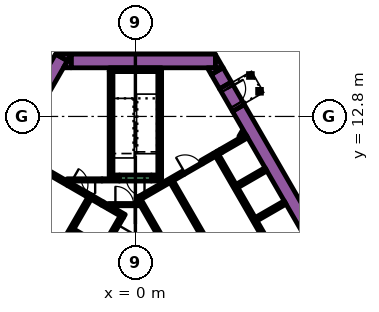
"""IFC4 building model, lengths in metres.
Left out: names, types, materials, properties, quantities, classifications, styles, units other than length and angle.
Written with IfcOpenShell. Run it as: python <this file> out.ifc"""

import sys

from ifc_helpers import new_model, si_unit, direction, frame, frame_2d, origin, origin_2d, place, context, subcontext, project, spatial, polyline, rectangle, outline, extrude, element, fill, save


model = new_model("IFC4")
c1 = context("Model", 3, precision=1e-05, world=origin(), true_north=direction((0.0, 1.0)))
c2 = subcontext(c1, "Body", "Model", "MODEL_VIEW")
j1 = project(units=[si_unit("LENGTHUNIT", "METRE"), si_unit("PLANEANGLEUNIT", "RADIAN")], contexts=[c1])
p1 = place(None, origin())
s1 = spatial("IfcSite", under=j1, at=p1, CompositionType="ELEMENT")
p2 = place(p1, origin())
s2 = spatial("IfcBuilding", under=s1, at=p2, CompositionType="ELEMENT")
p3 = place(p2, frame((0.0, 0.0, 11.4)))
s3 = spatial("IfcBuildingStorey", under=s2, at=p3, CompositionType="ELEMENT", Elevation=11.4)
p4 = place(p3, frame((6.776, 13.364, 0.0), z_axis=(0.0, 0.0, 1.0), x_axis=(0.500004177138, -0.8660229921, 0.0)))
e1 = element("IfcWall", 1, at=p4, inside=s3, PredefinedType="SOLIDWALL", context=c2, shape_type="SweptSolid", body=[
    extrude(rectangle(XDim=20.204, YDim=0.9, at=frame_2d((10.102, 0.0))), origin(), (0.0, 0.0, 1.0), 4.8),
])
p5 = place(p3, frame((-15.36, -1.503, 0.0), z_axis=(0.0, 0.0, 1.0), x_axis=(0.50000389221, 0.866023156604, 0.0)))
e2 = element("IfcWall", 2, at=p5, inside=s3, PredefinedType="SOLIDWALL", context=c2, shape_type="SweptSolid", body=[
    extrude(rectangle(XDim=21.0, YDim=0.9, at=frame_2d((10.5, 0.0))), origin(), (0.0, 0.0, 1.0), 4.8),
])
p6 = place(p3, origin())
e3 = element("IfcWall", 3, at=p6, inside=s3, PredefinedType="SOLIDWALL", context=c2, shape_type="SweptSolid", body=[
    extrude(outline(polyline([(-4.215, 16.9), (-4.469, 16.46), (-5.231, 16.9), (-4.215, 16.9)])), origin(), (0.0, 0.0, 1.0), 4.8),
])
p7 = place(p3, frame((-4.224, 16.45, 0.0), z_axis=(0.0, 0.0, 1.0), x_axis=(1.0, 0.0, 0.0)))
e4 = element("IfcWall", 4, at=p7, inside=s3, PredefinedType="SOLIDWALL", context=c2, shape_type="SweptSolid", body=[
    extrude(rectangle(XDim=9.488, YDim=0.9, at=frame_2d((4.744, 0.0))), origin(), (0.0, 0.0, 1.0), 4.8),
])
e5 = element("IfcWall", 5, at=p6, inside=s3, PredefinedType="SOLIDWALL", context=c2, shape_type="SweptSolid", body=[
    extrude(outline(polyline([(5.265, 16.0), (5.265, 16.88), (5.773, 16.0), (5.265, 16.0)])), origin(), (0.0, 0.0, 1.0), 4.8),
])
e6 = element("IfcWall", 6, at=p6, inside=s3, PredefinedType="SOLIDWALL", context=c2, shape_type="SweptSolid", body=[
    extrude(outline(polyline([(-4.734, 16.0), (-4.226, 16.88), (-4.226, 16.0), (-4.734, 16.0)])), origin(), (0.0, 0.0, 1.0), 4.8),
])
p8 = place(p3, frame((5.926, 14.836, 0.0), z_axis=(0.0, 0.0, 1.0), x_axis=(-0.500076735116, 0.865981096212, 0.0)))
e7 = element("IfcWall", 7, at=p8, inside=s3, PredefinedType="SOLIDWALL", context=c2, shape_type="SweptSolid", body=[
    extrude(rectangle(XDim=1.094, YDim=0.9, at=frame_2d((0.547, 0.0))), origin(), (0.0, 0.0, 1.0), 4.8),
])
e8 = element("IfcWall", 8, at=p6, inside=s3, PredefinedType="SOLIDWALL", context=c2, shape_type="SweptSolid", body=[
    extrude(outline(polyline([(4.734, 16.0), (5.75, 16.0), (4.988, 15.56), (4.734, 16.0)])), origin(), (0.0, 0.0, 1.0), 4.8),
])
p9 = place(p3, frame((-1.725, 15.875, 0.0), z_axis=(0.0, 0.0, 1.0), x_axis=(1.0, 0.0, 0.0)))
e9 = element("IfcWall", 9, at=p9, inside=s3, PredefinedType="SOLIDWALL", context=c2, shape_type="SweptSolid", body=[
    extrude(rectangle(XDim=3.45, YDim=0.25, at=frame_2d((1.725, 0.0))), origin(), (0.0, 0.0, 1.0), 4.8),
])
p10 = place(p3, frame((1.6, 8.95, 0.0), z_axis=(0.0, 0.0, 1.0), x_axis=(0.0, 1.0, 0.0)))
e10 = element("IfcWall", 10, at=p10, inside=s3, PredefinedType="SOLIDWALL", context=c2, shape_type="SweptSolid", body=[
    extrude(rectangle(XDim=6.8, YDim=0.25, at=frame_2d((3.4, 0.0))), origin(), (0.0, 0.0, 1.0), 4.8),
])
p11 = place(p3, frame((1.05, 8.825, 0.0), z_axis=(0.0, 0.0, 1.0), x_axis=(1.0, 0.0, 0.0)))
e11 = element("IfcWall", 11, at=p11, inside=s3, PredefinedType="SOLIDWALL", context=c2, shape_type="SweptSolid", body=[
    extrude(rectangle(XDim=0.675, YDim=0.25, at=frame_2d((0.337, 0.0))), origin(), (0.0, 0.0, 1.0), 4.8),
])
p12 = place(p3, frame((-1.6, 8.7, 0.0), z_axis=(0.0, 0.0, 1.0), x_axis=(0.0, 1.0, 0.0)))
e12 = element("IfcWall", 12, at=p12, inside=s3, PredefinedType="SOLIDWALL", context=c2, shape_type="SweptSolid", body=[
    extrude(rectangle(XDim=7.05, YDim=0.25, at=frame_2d((3.525, 0.0))), origin(), (0.0, 0.0, 1.0), 4.8),
])
p13 = place(p3, frame((-1.475, 8.825, 0.0), z_axis=(0.0, 0.0, 1.0), x_axis=(1.0, 0.0, 0.0)))
e13 = element("IfcWall", 13, at=p13, inside=s3, PredefinedType="SOLIDWALL", context=c2, shape_type="SweptSolid", body=[
    extrude(rectangle(XDim=0.425, YDim=0.25, at=frame_2d((0.212, 0.0))), origin(), (0.0, 0.0, 1.0), 4.8),
])
p14 = place(p3, frame((11.678, -0.677, 0.0), z_axis=(0.0, 0.0, 1.0), x_axis=(-0.500003135297, 0.866023593612, 0.0)))
e14 = element("IfcWall", 14, at=p14, inside=s3, PredefinedType="SOLIDWALL", context=c2, shape_type="SweptSolid", body=[
    extrude(rectangle(XDim=12.85, YDim=0.25, at=frame_2d((6.425, 0.0))), origin(), (0.0, 0.0, 1.0), 4.8),
])
e15 = element("IfcWall", 15, at=p6, inside=s3, PredefinedType="SOLIDWALL", context=c2, shape_type="SweptSolid", body=[
    extrude(outline(polyline([(6.552, -3.348), (6.677, -3.564), (6.46, -3.689), (4.897, -0.981), (0.332, 6.925), (0.335, 6.925), (0.335, 6.925), (0.335, 6.925), (0.335, 7.075), (0.335, 7.075), (0.335, 7.075), (0.245, 7.075), (0.079, 7.363), (0.035, 7.439), (0.252, 7.564), (0.377, 7.348), (6.552, -3.348)])), origin(), (0.0, 0.0, 1.0), 4.8),
])
p15 = place(p3, frame((4.358, 9.791, 0.0), z_axis=(0.0, 0.0, 1.0), x_axis=(0.866100000774, 0.49987077196, 0.0)))
e16 = element("IfcWall", 16, at=p15, inside=s3, PredefinedType="SOLIDWALL", context=c2, shape_type="SweptSolid", body=[
    extrude(rectangle(XDim=0.95, YDim=0.25, at=frame_2d((0.475, 0.0))), origin(), (0.0, 0.0, 1.0), 4.8),
])
p16 = place(p3, frame((0.314, 7.456, 0.0), z_axis=(0.0, 0.0, 1.0), x_axis=(0.866013897511, 0.50001992892, 0.0)))
e17 = element("IfcWall", 17, at=p16, inside=s3, PredefinedType="SOLIDWALL", context=c2, shape_type="SweptSolid", body=[
    extrude(rectangle(XDim=3.268, YDim=0.25, at=frame_2d((1.634, 0.0))), origin(), (0.0, 0.0, 1.0), 4.8),
])
p17 = place(p3, frame((5.469, 10.577, 0.0), z_axis=(0.0, 0.0, 1.0), x_axis=(0.499919672301, -0.866071776036, 0.0)))
e18 = element("IfcWall", 18, at=p17, inside=s3, PredefinedType="SOLIDWALL", context=c2, shape_type="SweptSolid", body=[
    extrude(rectangle(XDim=0.25, YDim=0.25, at=frame_2d((0.125, 0.0))), origin(), (0.0, 0.0, 1.0), 4.8),
])
p18 = place(p3, frame((5.64, 10.531, 0.0), z_axis=(0.0, 0.0, 1.0), x_axis=(0.866000020948, 0.500043961785, 0.0)))
e19 = element("IfcWall", 19, at=p18, inside=s3, PredefinedType="SOLIDWALL", context=c2, shape_type="SweptSolid", body=[
    extrude(rectangle(XDim=1.95, YDim=0.25, at=frame_2d((0.975, 0.0))), origin(), (0.0, 0.0, 1.0), 4.8),
])
for number, where, z_axis, x_axis in (
    (20, (8.589, 9.323, 0.0), (0.0, 0.0, 1.0), (-0.866, -0.5, 0.0)),
    (21, (7.944, 6.041, 0.0), (0.0, 0.0, 1.0), (0.866, 0.5, 0.0)),
):
    element("IfcWall", number, at=place(p3, frame(where, z_axis=z_axis, x_axis=x_axis)), inside=s3, PredefinedType="SOLIDWALL", context=c2, shape_type="SweptSolid", body=[
        extrude(rectangle(XDim=2.2, YDim=0.25, at=frame_2d((1.1, 0.0))), origin(), (0.0, 0.0, 1.0), 4.8),
    ])
p19 = place(p3, frame((-8.06, -1.311, 0.0), z_axis=(0.0, 0.0, 1.0), x_axis=(0.50000273126, 0.866023826885, 0.0)))
e22 = element("IfcWall", 22, at=p19, inside=s3, PredefinedType="SOLIDWALL", context=c2, shape_type="SweptSolid", body=[
    extrude(rectangle(XDim=10.33, YDim=0.25, at=frame_2d((5.165, 0.0))), origin(), (0.0, 0.0, 1.0), 4.8),
])
p20 = place(p3, frame((-1.819, 6.87, 0.0), z_axis=(0.0, 0.0, 1.0), x_axis=(-0.866294599386, 0.499533449405, 0.0)))
e23 = element("IfcWall", 23, at=p20, inside=s3, PredefinedType="SOLIDWALL", context=c2, shape_type="SweptSolid", body=[
    extrude(rectangle(XDim=0.41, YDim=0.25, at=frame_2d((0.205, 0.0))), origin(), (0.0, 0.0, 1.0), 4.8),
])
p21 = place(p3, frame((-2.849, 7.465, 0.0), z_axis=(0.0, 0.0, 1.0), x_axis=(0.865955664968, -0.500120771724, 0.0)))
e24 = element("IfcWall", 24, at=p21, inside=s3, PredefinedType="SOLIDWALL", context=c2, shape_type="SweptSolid", body=[
    extrude(rectangle(XDim=0.778, YDim=0.25, at=frame_2d((0.389, 0.0))), origin(), (0.0, 0.0, 1.0), 4.8),
])
p22 = place(p3, frame((-0.728, 6.24, 0.0), z_axis=(0.0, 0.0, 1.0), x_axis=(-0.866002680491, 0.500039355833, 0.0)))
e25 = element("IfcWall", 25, at=p22, inside=s3, PredefinedType="SOLIDWALL", context=c2, shape_type="SweptSolid", body=[
    extrude(rectangle(XDim=1.178, YDim=0.25, at=frame_2d((0.589, 0.0))), origin(), (0.0, 0.0, 1.0), 4.8),
])
p23 = place(p3, frame((-2.204, 4.182, 0.0), z_axis=(0.0, 0.0, 1.0), x_axis=(-0.866008176907, 0.50002983664, 0.0)))
e26 = element("IfcWall", 26, at=p23, inside=s3, PredefinedType="SOLIDWALL", context=c2, shape_type="SweptSolid", body=[
    extrude(rectangle(XDim=2.2, YDim=0.25, at=frame_2d((1.1, 0.0))), origin(), (0.0, 0.0, 1.0), 4.8),
])
e27 = element("IfcWall", 27, at=p6, inside=s3, PredefinedType="SOLIDWALL", context=c2, shape_type="SweptSolid", body=[
    extrude(outline(polyline([(-3.128, 7.481), (-3.259, 7.557), (-3.134, 7.773), (-3.003, 7.698), (-3.128, 7.481)])), origin(), (0.0, 0.0, 1.0), 4.8),
])
p24 = place(p3, frame((-7.959, 10.415, 0.0), z_axis=(0.0, 0.0, 1.0), x_axis=(0.866020958405, -0.500007699544, 0.0)))
e28 = element("IfcWall", 28, at=p24, inside=s3, PredefinedType="SOLIDWALL", context=c2, shape_type="SweptSolid", body=[
    extrude(rectangle(XDim=4.1, YDim=0.25, at=frame_2d((2.05, 0.0))), origin(), (0.0, 0.0, 1.0), 4.8),
])
p25 = place(p3, frame((-3.997, 8.625, 0.0), z_axis=(0.0, 0.0, 1.0), x_axis=(-1.0, 0.0, 0.0)))
e29 = element("IfcWall", 29, at=p25, inside=s3, PredefinedType="PARTITIONING", context=c2, shape_type="SweptSolid", body=[
    extrude(rectangle(XDim=0.502, YDim=0.15, at=frame_2d((0.251, 0.0))), origin(), (0.0, 0.0, 1.0), 3.9),
])
p26 = place(p3, frame((-2.196, 8.625, 0.0), z_axis=(0.0, 0.0, 1.0), x_axis=(1.0, 0.0, 0.0)))
e30 = element("IfcWall", 30, at=p26, inside=s3, PredefinedType="PARTITIONING", context=c2, shape_type="SweptSolid", body=[
    extrude(rectangle(XDim=1.146, YDim=0.15, at=frame_2d((0.573, 0.0))), origin(), (0.0, 0.0, 1.0), 3.9),
])
p27 = place(p3, frame((1.05, 8.625, 0.0), z_axis=(0.0, 0.0, 1.0), x_axis=(1.0, 0.0, 0.0)))
e31 = element("IfcWall", 31, at=p27, inside=s3, PredefinedType="PARTITIONING", context=c2, shape_type="SweptSolid", body=[
    extrude(rectangle(XDim=0.514, YDim=0.15, at=frame_2d((0.257, 0.0))), origin(), (0.0, 0.0, 1.0), 3.9),
])
p28 = place(p3, frame((6.872, 11.45, 0.0), z_axis=(0.0, 0.0, 1.0), x_axis=(0.499846793097, 0.866113839764, 0.0)))
e32 = element("IfcWall", 32, at=p28, inside=s3, PredefinedType="PARTITIONING", context=c2, shape_type="SweptSolid", body=[
    extrude(rectangle(XDim=0.453, YDim=0.15, at=frame_2d((0.227, 0.0))), origin(), (0.0, 0.0, 1.0), 3.9),
])
p29 = place(p3, frame((7.131, 11.6, 0.0), z_axis=(0.0, 0.0, 1.0), x_axis=(0.498600033135, 0.866832167699, 0.0)))
e33 = element("IfcWall", 33, at=p29, inside=s3, PredefinedType="PARTITIONING", context=c2, shape_type="SweptSolid", body=[
    extrude(rectangle(XDim=0.107, YDim=0.15, at=frame_2d((0.053, 0.0))), origin(), (0.0, 0.0, 1.0), 3.9),
])
p30 = place(p3, frame((8.565, -2.185, 0.0), z_axis=(0.0, 0.0, 1.0), x_axis=(-0.499997954832, 0.866026584559, 0.0)))
e34 = element("IfcWall", 34, at=p30, inside=s3, PredefinedType="SOLIDWALL", context=c2, shape_type="SweptSolid", body=[
    extrude(rectangle(XDim=12.35, YDim=0.25, at=frame_2d((6.175, 0.0))), origin(), (0.0, 0.0, 1.0), 4.8),
])
p31 = place(p30, frame((5.725, 0.0, 0.0)))
e35 = element("IfcOpeningElement", 35, at=p31, cuts=e34, PredefinedType="OPENING", context=c2, shape_type="SweptSolid", body=[
    extrude(rectangle(XDim=0.9, YDim=2.1, at=frame_2d((0.45, 1.05))), frame((0.0, 0.135, 0.0), z_axis=(0.0, -1.0, 0.0), x_axis=(1.0, 0.0, 0.0)), (0.0, 0.0, 1.0), 0.27),
])
p32 = place(p3, frame((-0.898, 6.194, 0.0), z_axis=(0.0, 0.0, 1.0), x_axis=(-0.499996202215, -0.866027596426, 0.0)))
e36 = element("IfcWall", 36, at=p32, inside=s3, PredefinedType="SOLIDWALL", context=c2, shape_type="SweptSolid", body=[
    extrude(rectangle(XDim=9.83, YDim=0.25, at=frame_2d((4.915, 0.0))), origin(), (0.0, 0.0, 1.0), 4.8),
])
p33 = place(p32, frame((0.585, 0.0, 0.0)))
e37 = element("IfcOpeningElement", 37, at=p33, cuts=e36, PredefinedType="OPENING", context=c2, shape_type="SweptSolid", body=[
    extrude(rectangle(XDim=1.1, YDim=2.1, at=frame_2d((0.55, 1.05))), frame((0.0, 0.135, 0.0), z_axis=(0.0, -1.0, 0.0), x_axis=(1.0, 0.0, 0.0)), (0.0, 0.0, 1.0), 0.27),
])
p34 = place(p32, frame((3.105, 0.0, 0.0)))
e38 = element("IfcOpeningElement", 38, at=p34, cuts=e36, PredefinedType="OPENING", context=c2, shape_type="SweptSolid", body=[
    extrude(rectangle(XDim=1.1, YDim=2.1, at=frame_2d((0.55, 1.05))), frame((0.0, 0.135, 0.0), z_axis=(0.0, -1.0, 0.0), x_axis=(1.0, 0.0, 0.0)), (0.0, 0.0, 1.0), 0.27),
])
p35 = place(p32, frame((5.625, 0.0, 0.0)))
e39 = element("IfcOpeningElement", 39, at=p35, cuts=e36, PredefinedType="OPENING", context=c2, shape_type="SweptSolid", body=[
    extrude(rectangle(XDim=1.1, YDim=2.1, at=frame_2d((0.55, 1.05))), frame((0.0, 0.135, 0.0), z_axis=(0.0, -1.0, 0.0), x_axis=(1.0, 0.0, 0.0)), (0.0, 0.0, 1.0), 0.27),
])
p36 = place(p32, frame((8.145, 0.0, 0.0)))
e40 = element("IfcOpeningElement", 40, at=p36, cuts=e36, PredefinedType="OPENING", context=c2, shape_type="SweptSolid", body=[
    extrude(rectangle(XDim=1.1, YDim=2.1, at=frame_2d((0.55, 1.05))), frame((0.0, 0.135, 0.0), z_axis=(0.0, -1.0, 0.0), x_axis=(1.0, 0.0, 0.0)), (0.0, 0.0, 1.0), 0.27),
])
p37 = place(p3, frame((1.05, 8.75, 0.0), z_axis=(0.0, 0.0, 1.0), x_axis=(-1.0, 0.0, 0.0)))
e41 = element("IfcWall", 41, at=p37, inside=s3, PredefinedType="SOLIDWALL", context=c2, shape_type="SweptSolid", body=[
    extrude(rectangle(XDim=2.1, YDim=0.4, at=frame_2d((1.05, 0.0))), origin(), (0.0, 0.0, 1.0), 4.8),
])
p38 = place(p37, frame((0.45, 0.0, 0.0)))
e42 = element("IfcOpeningElement", 42, at=p38, cuts=e41, PredefinedType="OPENING", context=c2, shape_type="SweptSolid", body=[
    extrude(rectangle(XDim=1.2, YDim=2.1, at=frame_2d((0.6, 1.05))), frame((0.0, 0.21, 0.0), z_axis=(0.0, -1.0, 0.0), x_axis=(1.0, 0.0, 0.0)), (0.0, 0.0, 1.0), 0.42),
])
p39 = place(p3, frame((-2.196, 8.625, 0.0), z_axis=(0.0, 0.0, 1.0), x_axis=(-1.0, 0.0, 0.0)))
e43 = element("IfcWall", 43, at=p39, inside=s3, PredefinedType="PARTITIONING", context=c2, shape_type="SweptSolid", body=[
    extrude(rectangle(XDim=1.8, YDim=0.15, at=frame_2d((0.9, 0.0))), origin(), (0.0, 0.0, 1.0), 3.9),
])
p40 = place(p39, frame((0.45, 0.0, 0.0)))
e44 = element("IfcOpeningElement", 44, at=p40, cuts=e43, PredefinedType="OPENING", context=c2, shape_type="SweptSolid", body=[
    extrude(rectangle(XDim=0.9, YDim=2.1, at=frame_2d((0.45, 1.05))), frame((0.0, 0.085, 0.0), z_axis=(0.0, -1.0, 0.0), x_axis=(1.0, 0.0, 0.0)), (0.0, 0.0, 1.0), 0.17),
])
p41 = place(p3, frame((-1.765, 7.0, 0.0), z_axis=(0.0, 0.0, 1.0), x_axis=(1.0, 0.0, 0.0)))
e45 = element("IfcWall", 45, at=p41, inside=s3, PredefinedType="PARTITIONING", context=c2, shape_type="SweptSolid", body=[
    extrude(rectangle(XDim=2.1, YDim=0.15, at=frame_2d((1.05, 0.0))), origin(), (0.0, 0.0, 1.0), 3.9),
])
p42 = place(p41, frame((0.45, 0.0, 0.0)))
e46 = element("IfcOpeningElement", 46, at=p42, cuts=e45, PredefinedType="OPENING", context=c2, shape_type="SweptSolid", body=[
    extrude(rectangle(XDim=1.2, YDim=2.1, at=frame_2d((0.6, 1.05))), frame((0.0, 0.085, 0.0), z_axis=(0.0, -1.0, 0.0), x_axis=(1.0, 0.0, 0.0)), (0.0, 0.0, 1.0), 0.17),
])
p43 = place(p3, frame((3.183, 9.02, 0.0), z_axis=(0.0, 0.0, 1.0), x_axis=(0.866034573852, 0.49998411664, 0.0)))
e47 = element("IfcWall", 47, at=p43, inside=s3, PredefinedType="PARTITIONING", context=c2, shape_type="SweptSolid", body=[
    extrude(rectangle(XDim=1.4, YDim=0.09, at=frame_2d((0.7, 0.0))), origin(), (0.0, 0.0, 1.0), 3.9),
])
p44 = place(p43, frame((0.1, 0.0, 0.0)))
e48 = element("IfcOpeningElement", 48, at=p44, cuts=e47, PredefinedType="OPENING", context=c2, shape_type="SweptSolid", body=[
    extrude(rectangle(XDim=1.2, YDim=2.1, at=frame_2d((0.6, 1.05))), frame((0.0, 0.055, 0.0), z_axis=(0.0, -1.0, 0.0), x_axis=(1.0, 0.0, 0.0)), (0.0, 0.0, 1.0), 0.11),
])
p45 = place(p3, frame((-4.409, 8.365, 0.0), z_axis=(0.0, 0.0, 1.0), x_axis=(0.866034573852, -0.49998411664, 0.0)))
e49 = element("IfcWall", 49, at=p45, inside=s3, PredefinedType="SOLIDWALL", context=c2, shape_type="SweptSolid", body=[
    extrude(rectangle(XDim=1.4, YDim=0.25, at=frame_2d((0.7, 0.0))), origin(), (0.0, 0.0, 1.0), 4.8),
])
p46 = place(p45, frame((0.1, 0.0, 0.0)))
e50 = element("IfcOpeningElement", 50, at=p46, cuts=e49, PredefinedType="OPENING", context=c2, shape_type="SweptSolid", body=[
    extrude(rectangle(XDim=1.2, YDim=2.1, at=frame_2d((0.6, 1.05))), frame((0.0, 0.135, 0.0), z_axis=(0.0, -1.0, 0.0), x_axis=(1.0, 0.0, 0.0)), (0.0, 0.0, 1.0), 0.27),
])
p47 = place(p3, frame((5.926, 14.836, 0.0), z_axis=(0.0, 0.0, 1.0), x_axis=(0.500062241894, -0.865989465428, 0.0)))
e51 = element("IfcWall", 51, at=p47, inside=s3, PredefinedType="SOLIDWALL", context=c2, shape_type="SweptSolid", body=[
    extrude(rectangle(XDim=1.7, YDim=0.9, at=frame_2d((0.85, 0.0))), origin(), (0.0, 0.0, 1.0), 4.8),
])
p48 = place(p47, frame((0.25, 0.0, 0.0)))
e52 = element("IfcOpeningElement", 52, at=p48, cuts=e51, PredefinedType="OPENING", context=c2, shape_type="SweptSolid", body=[
    extrude(rectangle(XDim=1.2, YDim=2.1, at=frame_2d((0.6, 1.05))), frame((0.0, 0.46, 0.0), z_axis=(0.0, -1.0, 0.0), x_axis=(1.0, 0.0, 0.0)), (0.0, 0.0, 1.0), 0.92),
])
for number, where, z_axis, x_axis in (
    (53, (8.167, 14.455, 0.0), (0.0, 0.0, 1.0), (1.0, 0.0, 0.0)),
    (54, (7.566, 15.495, 0.0), (0.0, 0.0, 1.0), (1.0, 0.0, 0.0)),
):
    element("IfcColumn", number, at=place(p3, frame(where, z_axis=z_axis, x_axis=x_axis)), inside=s3, PredefinedType="COLUMN", context=c2, shape_type="SweptSolid", body=[
        extrude(rectangle(XDim=0.25, YDim=0.25, at=origin_2d()), origin(), (0.0, 0.0, 1.0), 4.6),
    ])
p49 = place(p33, origin())
e55 = element("IfcDoor", 55, at=p49, inside=s3, OperationType="DOUBLE_DOOR_SLIDING", PredefinedType="DOOR", context=c2, shape_type="SweptSolid", body=[
    extrude(rectangle(XDim=1.1, YDim=2.1, at=frame_2d((0.55, 1.05))), frame((0.0, 0.025, 0.0), z_axis=(0.0, -1.0, 0.0), x_axis=(1.0, 0.0, 0.0)), (0.0, 0.0, 1.0), 0.05),
])
fill(e37, e55)
p50 = place(p38, origin())
e56 = element("IfcDoor", 56, at=p50, inside=s3, OperationType="SINGLE_SWING_LEFT", PredefinedType="DOOR", context=c2, shape_type="SweptSolid", body=[
    extrude(rectangle(XDim=1.2, YDim=2.1, at=frame_2d((0.6, 1.05))), frame((0.0, 0.025, 0.0), z_axis=(0.0, -1.0, 0.0), x_axis=(1.0, 0.0, 0.0)), (0.0, 0.0, 1.0), 0.05),
])
fill(e42, e56)
p51 = place(p40, origin())
e57 = element("IfcDoor", 57, at=p51, inside=s3, OperationType="SINGLE_SWING_LEFT", PredefinedType="DOOR", context=c2, shape_type="SweptSolid", body=[
    extrude(rectangle(XDim=0.9, YDim=2.1, at=frame_2d((0.45, 1.05))), frame((0.0, 0.025, 0.0), z_axis=(0.0, -1.0, 0.0), x_axis=(1.0, 0.0, 0.0)), (0.0, 0.0, 1.0), 0.05),
])
fill(e44, e57)
p52 = place(p42, origin())
e58 = element("IfcDoor", 58, at=p52, inside=s3, OperationType="SINGLE_SWING_LEFT", PredefinedType="DOOR", context=c2, shape_type="SweptSolid", body=[
    extrude(rectangle(XDim=1.2, YDim=2.1, at=frame_2d((0.6, 1.05))), frame((0.0, 0.025, 0.0), z_axis=(0.0, -1.0, 0.0), x_axis=(1.0, 0.0, 0.0)), (0.0, 0.0, 1.0), 0.05),
])
fill(e46, e58)
p53 = place(p44, origin())
e59 = element("IfcDoor", 59, at=p53, inside=s3, OperationType="SINGLE_SWING_LEFT", PredefinedType="DOOR", context=c2, shape_type="SweptSolid", body=[
    extrude(rectangle(XDim=1.2, YDim=2.1, at=frame_2d((0.6, 1.05))), frame((0.0, 0.025, 0.0), z_axis=(0.0, -1.0, 0.0), x_axis=(1.0, 0.0, 0.0)), (0.0, 0.0, 1.0), 0.05),
])
fill(e48, e59)
p54 = place(p46, origin())
e60 = element("IfcDoor", 60, at=p54, inside=s3, OperationType="SINGLE_SWING_LEFT", PredefinedType="DOOR", context=c2, shape_type="SweptSolid", body=[
    extrude(rectangle(XDim=1.2, YDim=2.1, at=frame_2d((0.6, 1.05))), frame((0.0, 0.025, 0.0), z_axis=(0.0, -1.0, 0.0), x_axis=(1.0, 0.0, 0.0)), (0.0, 0.0, 1.0), 0.05),
])
fill(e50, e60)
p55 = place(p48, origin())
e61 = element("IfcDoor", 61, at=p55, inside=s3, OperationType="SINGLE_SWING_LEFT", PredefinedType="DOOR", context=c2, shape_type="SweptSolid", body=[
    extrude(rectangle(XDim=1.2, YDim=2.1, at=frame_2d((0.6, 1.05))), frame((0.0, 0.025, 0.0), z_axis=(0.0, -1.0, 0.0), x_axis=(1.0, 0.0, 0.0)), (0.0, 0.0, 1.0), 0.05),
])
fill(e52, e61)
save(model, sys.argv[1])
